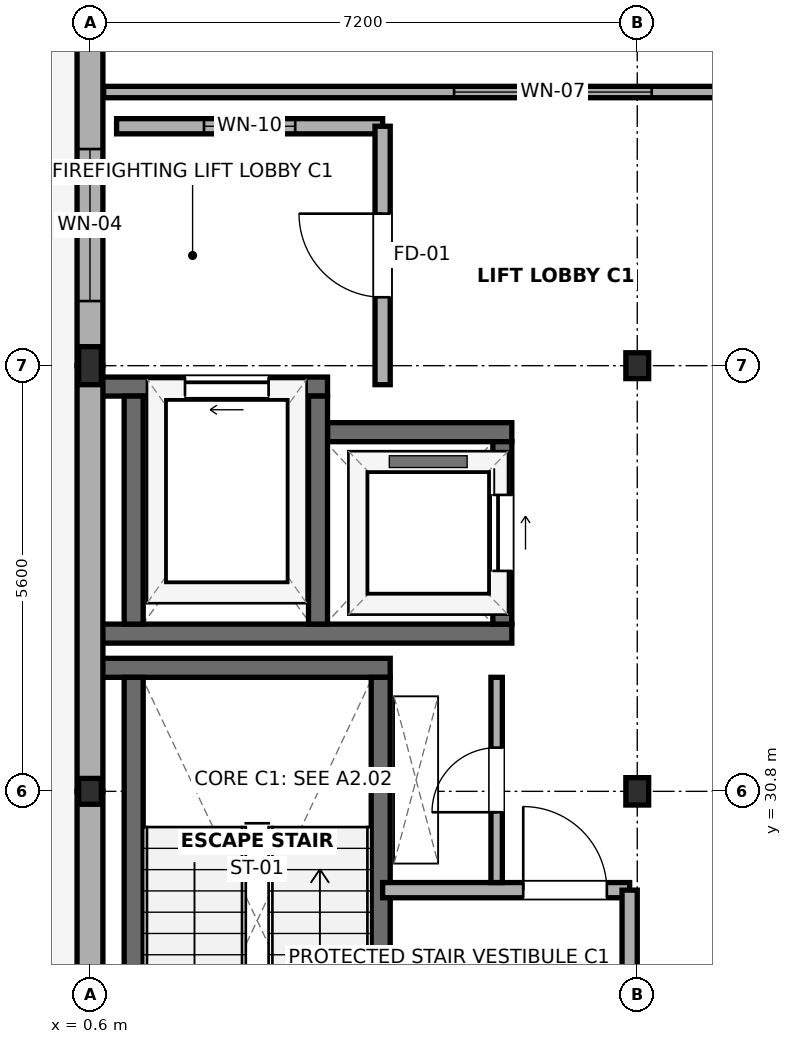
"""IFC4 building model, lengths in metres.
Left out: names, types, materials, properties, quantities, classifications, styles, units other than length and angle.
Written with IfcOpenShell. Run it as: python <this file> out.ifc"""

import sys

from ifc_helpers import new_model, si_unit, direction, frame, frame_2d, origin, origin_2d, place, context, subcontext, project, spatial, rectangle, i_section, extrude, element, fill, save


model = new_model("IFC4")
c1 = context("Model", 3, precision=1e-05, world=origin(), true_north=direction((0.0, 1.0)))
c2 = subcontext(c1, "Body", "Model", "MODEL_VIEW")
j1 = project(units=[si_unit("LENGTHUNIT", "METRE"), si_unit("PLANEANGLEUNIT", "RADIAN")], contexts=[c1])
p1 = place(None, origin())
s1 = spatial("IfcSite", under=j1, at=p1, CompositionType="ELEMENT")
p2 = place(p1, origin())
s2 = spatial("IfcBuilding", under=s1, at=p2, CompositionType="ELEMENT")
p3 = place(p2, frame((0.0, 0.0, 21.0)))
s3 = spatial("IfcBuildingStorey", under=s2, at=p3, CompositionType="ELEMENT", Elevation=21.0)
p4 = place(p3, frame((0.6, 30.8, 0.0), z_axis=(0.0, 0.0, 1.0), x_axis=(1.0, 0.0, 0.0)))
e1 = element("IfcColumn", 1, at=p4, inside=s3, PredefinedType="COLUMN", context=c2, shape_type="SweptSolid", body=[
    extrude(i_section(OverallWidth=0.3, OverallDepth=0.34, WebThickness=0.012, FlangeThickness=0.021, FilletRadius=0.027, at=origin_2d()), origin(), (0.0, 0.0, 1.0), 3.9),
])
p5 = place(p3, frame((0.6, 36.4, 0.0), z_axis=(0.0, 0.0, 1.0), x_axis=(1.0, 0.0, 0.0)))
e2 = element("IfcColumn", 2, at=p5, inside=s3, PredefinedType="COLUMN", context=c2, shape_type="SweptSolid", body=[
    extrude(i_section(OverallWidth=0.3, OverallDepth=0.5, WebThickness=0.014, FlangeThickness=0.028, FilletRadius=0.027, at=origin_2d()), origin(), (0.0, 0.0, 1.0), 3.9),
])
p6 = place(p3, frame((7.8, 30.8, 0.0), z_axis=(0.0, 0.0, 1.0), x_axis=(1.0, 0.0, 0.0)))
e3 = element("IfcColumn", 3, at=p6, inside=s3, PredefinedType="COLUMN", context=c2, shape_type="SweptSolid", body=[
    extrude(i_section(OverallWidth=0.3, OverallDepth=0.36, WebThickness=0.012, FlangeThickness=0.022, FilletRadius=0.027, at=origin_2d()), origin(), (0.0, 0.0, 1.0), 3.9),
])
p7 = place(p3, frame((7.8, 36.4, 0.0), z_axis=(0.0, 0.0, 1.0), x_axis=(1.0, 0.0, 0.0)))
e4 = element("IfcColumn", 4, at=p7, inside=s3, PredefinedType="COLUMN", context=c2, shape_type="SweptSolid", body=[
    extrude(i_section(OverallWidth=0.3, OverallDepth=0.34, WebThickness=0.012, FlangeThickness=0.021, FilletRadius=0.027, at=origin_2d()), origin(), (0.0, 0.0, 1.0), 3.9),
])
p8 = place(p3, frame((0.75, 32.425, 0.0), z_axis=(0.0, 0.0, 1.0), x_axis=(1.0, 0.0, 0.0)))
e5 = element("IfcWall", 5, at=p8, inside=s3, PredefinedType="SHEAR", context=c2, shape_type="SweptSolid", body=[
    extrude(rectangle(XDim=3.8, YDim=0.25, at=frame_2d((1.9, 0.0))), origin(), (0.0, 0.0, 1.0), 3.7),
])
p9 = place(p3, frame((1.175, 25.9, 0.0), z_axis=(0.0, 0.0, 1.0), x_axis=(0.0, 1.0, 0.0)))
e6 = element("IfcWall", 6, at=p9, inside=s3, PredefinedType="SHEAR", context=c2, shape_type="SweptSolid", body=[
    extrude(rectangle(XDim=6.4, YDim=0.25, at=frame_2d((3.2, 0.0))), origin(), (0.0, 0.0, 1.0), 3.7),
])
p10 = place(p3, frame((4.425, 25.9, 0.0), z_axis=(0.0, 0.0, 1.0), x_axis=(0.0, 1.0, 0.0)))
e7 = element("IfcWall", 7, at=p10, inside=s3, PredefinedType="SHEAR", context=c2, shape_type="SweptSolid", body=[
    extrude(rectangle(XDim=6.4, YDim=0.25, at=frame_2d((3.2, 0.0))), origin(), (0.0, 0.0, 1.0), 3.7),
])
p11 = place(p10, frame((0.17, 0.0, 0.0)))
e8 = element("IfcOpeningElement", 8, at=p11, cuts=e7, PredefinedType="OPENING", context=c2, shape_type="SweptSolid", body=[
    extrude(rectangle(XDim=1.1, YDim=2.15, at=frame_2d((0.55, 1.075))), frame((0.0, 0.14, 0.0), z_axis=(0.0, -1.0, 0.0), x_axis=(1.0, 0.0, 0.0)), (0.0, 0.0, 1.0), 0.28),
])
p12 = place(p3, frame((0.75, 32.875, 0.0), z_axis=(0.0, 0.0, 1.0), x_axis=(1.0, 0.0, 0.0)))
e9 = element("IfcWall", 9, at=p12, inside=s3, PredefinedType="SHEAR", context=c2, shape_type="SweptSolid", body=[
    extrude(rectangle(XDim=5.4, YDim=0.25, at=frame_2d((2.7, 0.0))), origin(), (0.0, 0.0, 1.0), 3.7),
])
p13 = place(p3, frame((0.75, 36.125, 0.0), z_axis=(0.0, 0.0, 1.0), x_axis=(1.0, 0.0, 0.0)))
e10 = element("IfcWall", 10, at=p13, inside=s3, PredefinedType="SHEAR", context=c2, shape_type="SweptSolid", body=[
    extrude(rectangle(XDim=2.975, YDim=0.25, at=frame_2d((1.488, 0.0))), origin(), (0.0, 0.0, 1.0), 3.7),
])
p14 = place(p13, frame((1.1, 0.0, 0.0)))
e11 = element("IfcOpeningElement", 11, at=p14, cuts=e10, PredefinedType="OPENING", context=c2, shape_type="SweptSolid", body=[
    extrude(rectangle(XDim=1.1, YDim=2.15, at=frame_2d((0.55, 1.075))), frame((0.0, 0.14, 0.0), z_axis=(0.0, -1.0, 0.0), x_axis=(1.0, 0.0, 0.0)), (0.0, 0.0, 1.0), 0.28),
])
p15 = place(p3, frame((3.725, 35.525, 0.0), z_axis=(0.0, 0.0, 1.0), x_axis=(1.0, 0.0, 0.0)))
e12 = element("IfcWall", 12, at=p15, inside=s3, PredefinedType="SHEAR", context=c2, shape_type="SweptSolid", body=[
    extrude(rectangle(XDim=2.425, YDim=0.25, at=frame_2d((1.212, 0.0))), origin(), (0.0, 0.0, 1.0), 3.7),
])
for number, where, z_axis, x_axis in (
    (13, (1.175, 33.0, 0.0), (0.0, 0.0, 1.0), (0.0, 1.0, 0.0)),
    (14, (3.6, 33.0, 0.0), (0.0, 0.0, 1.0), (0.0, 1.0, 0.0)),
):
    element("IfcWall", number, at=place(p3, frame(where, z_axis=z_axis, x_axis=x_axis)), inside=s3, PredefinedType="SHEAR", context=c2, shape_type="SweptSolid", body=[
        extrude(rectangle(XDim=3.0, YDim=0.25, at=frame_2d((1.5, 0.0))), origin(), (0.0, 0.0, 1.0), 3.7),
    ])
p16 = place(p3, frame((6.025, 33.0, 0.0), z_axis=(0.0, 0.0, 1.0), x_axis=(0.0, 1.0, 0.0)))
e15 = element("IfcWall", 15, at=p16, inside=s3, PredefinedType="SHEAR", context=c2, shape_type="SweptSolid", body=[
    extrude(rectangle(XDim=2.4, YDim=0.25, at=frame_2d((1.2, 0.0))), origin(), (0.0, 0.0, 1.0), 3.7),
])
p17 = place(p16, frame((0.7, 0.0, 0.0)))
e16 = element("IfcOpeningElement", 16, at=p17, cuts=e15, PredefinedType="OPENING", context=c2, shape_type="SweptSolid", body=[
    extrude(rectangle(XDim=1.0, YDim=2.15, at=frame_2d((0.5, 1.075))), frame((0.0, 0.14, 0.0), z_axis=(0.0, -1.0, 0.0), x_axis=(1.0, 0.0, 0.0)), (0.0, 0.0, 1.0), 0.28),
])
p18 = place(p3, frame((0.6, 25.2, 0.0), z_axis=(0.0, 0.0, 1.0), x_axis=(0.0, 1.0, 0.0)))
e17 = element("IfcWall", 17, at=p18, inside=s3, PredefinedType="SOLIDWALL", context=c2, shape_type="SweptSolid", body=[
    extrude(rectangle(XDim=5.6, YDim=0.34, at=frame_2d((2.8, 0.0))), origin(), (0.0, 0.0, 1.0), 3.245),
])
p19 = place(p3, frame((0.6, 30.8, 0.0), z_axis=(0.0, 0.0, 1.0), x_axis=(0.0, 1.0, 0.0)))
e18 = element("IfcWall", 18, at=p19, inside=s3, PredefinedType="SOLIDWALL", context=c2, shape_type="SweptSolid", body=[
    extrude(rectangle(XDim=5.6, YDim=0.34, at=frame_2d((2.8, 0.0))), origin(), (0.0, 0.0, 1.0), 3.095),
])
p20 = place(p3, frame((0.6, 36.4, 0.0), z_axis=(0.0, 0.0, 1.0), x_axis=(0.0, 1.0, 0.0)))
e19 = element("IfcWall", 19, at=p20, inside=s3, PredefinedType="SOLIDWALL", context=c2, shape_type="SweptSolid", body=[
    extrude(rectangle(XDim=5.6, YDim=0.34, at=frame_2d((2.8, 0.0))), origin(), (0.0, 0.0, 1.0), 3.095),
])
p21 = place(p20, frame((0.85, 0.0, 0.9)))
e20 = element("IfcOpeningElement", 20, at=p21, cuts=e19, PredefinedType="OPENING", context=c2, shape_type="SweptSolid", body=[
    extrude(rectangle(XDim=2.0, YDim=1.8, at=frame_2d((1.0, 0.9))), frame((0.0, 0.185, 0.0), z_axis=(0.0, -1.0, 0.0), x_axis=(1.0, 0.0, 0.0)), (0.0, 0.0, 1.0), 0.37),
])
p22 = place(p3, frame((0.95, 39.55, 0.0), z_axis=(0.0, 0.0, 1.0), x_axis=(1.0, 0.0, 0.0)))
e21 = element("IfcWall", 21, at=p22, inside=s3, PredefinedType="PARTITIONING", context=c2, shape_type="SweptSolid", body=[
    extrude(rectangle(XDim=3.5, YDim=0.2, at=frame_2d((1.75, 0.0))), origin(), (0.0, 0.0, 1.0), 3.695),
])
p23 = place(p22, frame((1.15, 0.0, 0.95)))
e22 = element("IfcOpeningElement", 22, at=p23, cuts=e21, PredefinedType="OPENING", context=c2, shape_type="SweptSolid", body=[
    extrude(rectangle(XDim=1.2, YDim=1.5, at=frame_2d((0.6, 0.75))), frame((0.0, 0.115, 0.0), z_axis=(0.0, -1.0, 0.0), x_axis=(1.0, 0.0, 0.0)), (0.0, 0.0, 1.0), 0.23),
])
p24 = place(p3, frame((4.45, 36.15, 0.0), z_axis=(0.0, 0.0, 1.0), x_axis=(0.0, 1.0, 0.0)))
e23 = element("IfcWall", 23, at=p24, inside=s3, PredefinedType="PARTITIONING", context=c2, shape_type="SweptSolid", body=[
    extrude(rectangle(XDim=3.4, YDim=0.2, at=frame_2d((1.7, 0.0))), origin(), (0.0, 0.0, 1.0), 3.365),
])
p25 = place(p24, frame((1.15, 0.0, 0.0)))
e24 = element("IfcOpeningElement", 24, at=p25, cuts=e23, PredefinedType="OPENING", context=c2, shape_type="SweptSolid", body=[
    extrude(rectangle(XDim=1.1, YDim=2.15, at=frame_2d((0.55, 1.075))), frame((0.0, 0.115, 0.0), z_axis=(0.0, -1.0, 0.0), x_axis=(1.0, 0.0, 0.0)), (0.0, 0.0, 1.0), 0.23),
])
p26 = place(p3, frame((4.45, 29.5, 0.0), z_axis=(0.0, 0.0, 1.0), x_axis=(1.0, 0.0, 0.0)))
e25 = element("IfcWall", 25, at=p26, inside=s3, PredefinedType="PARTITIONING", context=c2, shape_type="SweptSolid", body=[
    extrude(rectangle(XDim=3.25, YDim=0.2, at=frame_2d((1.625, 0.0))), origin(), (0.0, 0.0, 1.0), 3.195),
])
p27 = place(p26, frame((1.85, 0.0, 0.0)))
e26 = element("IfcOpeningElement", 26, at=p27, cuts=e25, PredefinedType="OPENING", context=c2, shape_type="SweptSolid", body=[
    extrude(rectangle(XDim=1.1, YDim=2.15, at=frame_2d((0.55, 1.075))), frame((0.0, 0.115, 0.0), z_axis=(0.0, -1.0, 0.0), x_axis=(1.0, 0.0, 0.0)), (0.0, 0.0, 1.0), 0.23),
])
p28 = place(p3, frame((7.7, 25.9, 0.0), z_axis=(0.0, 0.0, 1.0), x_axis=(0.0, 1.0, 0.0)))
e27 = element("IfcWall", 27, at=p28, inside=s3, PredefinedType="PARTITIONING", context=c2, shape_type="SweptSolid", body=[
    extrude(rectangle(XDim=3.6, YDim=0.2, at=frame_2d((1.8, 0.0))), origin(), (0.0, 0.0, 1.0), 3.195),
])
p29 = place(p28, frame((1.25, 0.0, 0.0)))
e28 = element("IfcOpeningElement", 28, at=p29, cuts=e27, PredefinedType="OPENING", context=c2, shape_type="SweptSolid", body=[
    extrude(rectangle(XDim=1.1, YDim=2.15, at=frame_2d((0.55, 1.075))), frame((0.0, 0.115, 0.0), z_axis=(0.0, -1.0, 0.0), x_axis=(1.0, 0.0, 0.0)), (0.0, 0.0, 1.0), 0.23),
])
p30 = place(p3, frame((5.95, 29.6, 0.0), z_axis=(0.0, 0.0, 1.0), x_axis=(0.0, 1.0, 0.0)))
e29 = element("IfcWall", 29, at=p30, inside=s3, PredefinedType="PARTITIONING", context=c2, shape_type="SweptSolid", body=[
    extrude(rectangle(XDim=2.7, YDim=0.15, at=frame_2d((1.35, 0.0))), origin(), (0.0, 0.0, 1.0), 3.695),
])
p31 = place(p30, frame((0.925, 0.0, 0.0)))
e30 = element("IfcOpeningElement", 30, at=p31, cuts=e29, PredefinedType="OPENING", context=c2, shape_type="SweptSolid", body=[
    extrude(rectangle(XDim=0.85, YDim=2.1, at=frame_2d((0.425, 1.05))), frame((0.0, 0.09, 0.0), z_axis=(0.0, -1.0, 0.0), x_axis=(1.0, 0.0, 0.0)), (0.0, 0.0, 1.0), 0.18),
])
p32 = place(p3, frame((0.78, 40.0, 0.0), z_axis=(0.0, 0.0, 1.0), x_axis=(1.0, 0.0, 0.0)))
e31 = element("IfcWall", 31, at=p32, inside=s3, PredefinedType="PARTITIONING", context=c2, shape_type="SweptSolid", body=[
    extrude(rectangle(XDim=11.82, YDim=0.15, at=frame_2d((5.91, 0.0))), origin(), (0.0, 0.0, 1.0), 3.095),
])
p33 = place(p32, frame((4.61, 0.0, 0.95)))
e32 = element("IfcOpeningElement", 32, at=p33, cuts=e31, PredefinedType="OPENING", context=c2, shape_type="SweptSolid", body=[
    extrude(rectangle(XDim=2.6, YDim=1.5, at=frame_2d((1.3, 0.75))), frame((0.0, 0.09, 0.0), z_axis=(0.0, -1.0, 0.0), x_axis=(1.0, 0.0, 0.0)), (0.0, 0.0, 1.0), 0.18),
])
p34 = place(p21, origin())
e33 = element("IfcWindow", 33, at=p34, inside=s3, PartitioningType="SINGLE_PANEL", PredefinedType="WINDOW", context=c2, shape_type="SweptSolid", body=[
    extrude(rectangle(XDim=2.0, YDim=1.8, at=frame_2d((1.0, 0.9))), frame((0.0, 0.03, 0.0), z_axis=(0.0, -1.0, 0.0), x_axis=(1.0, 0.0, 0.0)), (0.0, 0.0, 1.0), 0.06),
])
fill(e20, e33)
p35 = place(p14, origin())
e34 = element("IfcDoor", 34, at=p35, inside=s3, OperationType="SLIDING_TO_LEFT", PredefinedType="DOOR", context=c2, shape_type="SweptSolid", body=[
    extrude(rectangle(XDim=1.1, YDim=2.15, at=frame_2d((0.55, 1.075))), frame((0.0, 0.025, 0.0), z_axis=(0.0, -1.0, 0.0), x_axis=(1.0, 0.0, 0.0)), (0.0, 0.0, 1.0), 0.05),
])
fill(e11, e34)
p36 = place(p17, frame((1.0, 0.0, 0.0), z_axis=(0.0, 0.0, 1.0), x_axis=(-1.0, 0.0, 0.0)))
e35 = element("IfcDoor", 35, at=p36, inside=s3, OperationType="SLIDING_TO_RIGHT", PredefinedType="DOOR", context=c2, shape_type="SweptSolid", body=[
    extrude(rectangle(XDim=1.0, YDim=2.15, at=frame_2d((0.5, 1.075))), frame((0.0, 0.025, 0.0), z_axis=(0.0, -1.0, 0.0), x_axis=(1.0, 0.0, 0.0)), (0.0, 0.0, 1.0), 0.05),
])
fill(e16, e35)
p37 = place(p23, origin())
e36 = element("IfcWindow", 36, at=p37, inside=s3, PartitioningType="SINGLE_PANEL", PredefinedType="WINDOW", context=c2, shape_type="SweptSolid", body=[
    extrude(rectangle(XDim=1.2, YDim=1.5, at=frame_2d((0.6, 0.75))), frame((0.0, 0.03, 0.0), z_axis=(0.0, -1.0, 0.0), x_axis=(1.0, 0.0, 0.0)), (0.0, 0.0, 1.0), 0.06),
])
fill(e22, e36)
p38 = place(p25, origin())
e37 = element("IfcDoor", 37, at=p38, inside=s3, OperationType="SINGLE_SWING_RIGHT", PredefinedType="DOOR", context=c2, shape_type="SweptSolid", body=[
    extrude(rectangle(XDim=1.1, YDim=2.15, at=frame_2d((0.55, 1.075))), frame((0.0, 0.025, 0.0), z_axis=(0.0, -1.0, 0.0), x_axis=(1.0, 0.0, 0.0)), (0.0, 0.0, 1.0), 0.05),
])
fill(e24, e37)
p39 = place(p27, origin())
e38 = element("IfcDoor", 38, at=p39, inside=s3, OperationType="SINGLE_SWING_LEFT", PredefinedType="DOOR", context=c2, shape_type="SweptSolid", body=[
    extrude(rectangle(XDim=1.1, YDim=2.15, at=frame_2d((0.55, 1.075))), frame((0.0, 0.025, 0.0), z_axis=(0.0, -1.0, 0.0), x_axis=(1.0, 0.0, 0.0)), (0.0, 0.0, 1.0), 0.05),
])
fill(e26, e38)
p40 = place(p31, origin())
e39 = element("IfcDoor", 39, at=p40, inside=s3, OperationType="SINGLE_SWING_LEFT", PredefinedType="DOOR", context=c2, shape_type="SweptSolid", body=[
    extrude(rectangle(XDim=0.85, YDim=2.1, at=frame_2d((0.425, 1.05))), frame((0.0, 0.025, 0.0), z_axis=(0.0, -1.0, 0.0), x_axis=(1.0, 0.0, 0.0)), (0.0, 0.0, 1.0), 0.05),
])
fill(e30, e39)
p41 = place(p33, origin())
e40 = element("IfcWindow", 40, at=p41, inside=s3, PartitioningType="SINGLE_PANEL", PredefinedType="WINDOW", context=c2, shape_type="SweptSolid", body=[
    extrude(rectangle(XDim=2.6, YDim=1.5, at=frame_2d((1.3, 0.75))), frame((0.0, 0.03, 0.0), z_axis=(0.0, -1.0, 0.0), x_axis=(1.0, 0.0, 0.0)), (0.0, 0.0, 1.0), 0.06),
])
fill(e32, e40)
save(model, sys.argv[1])
